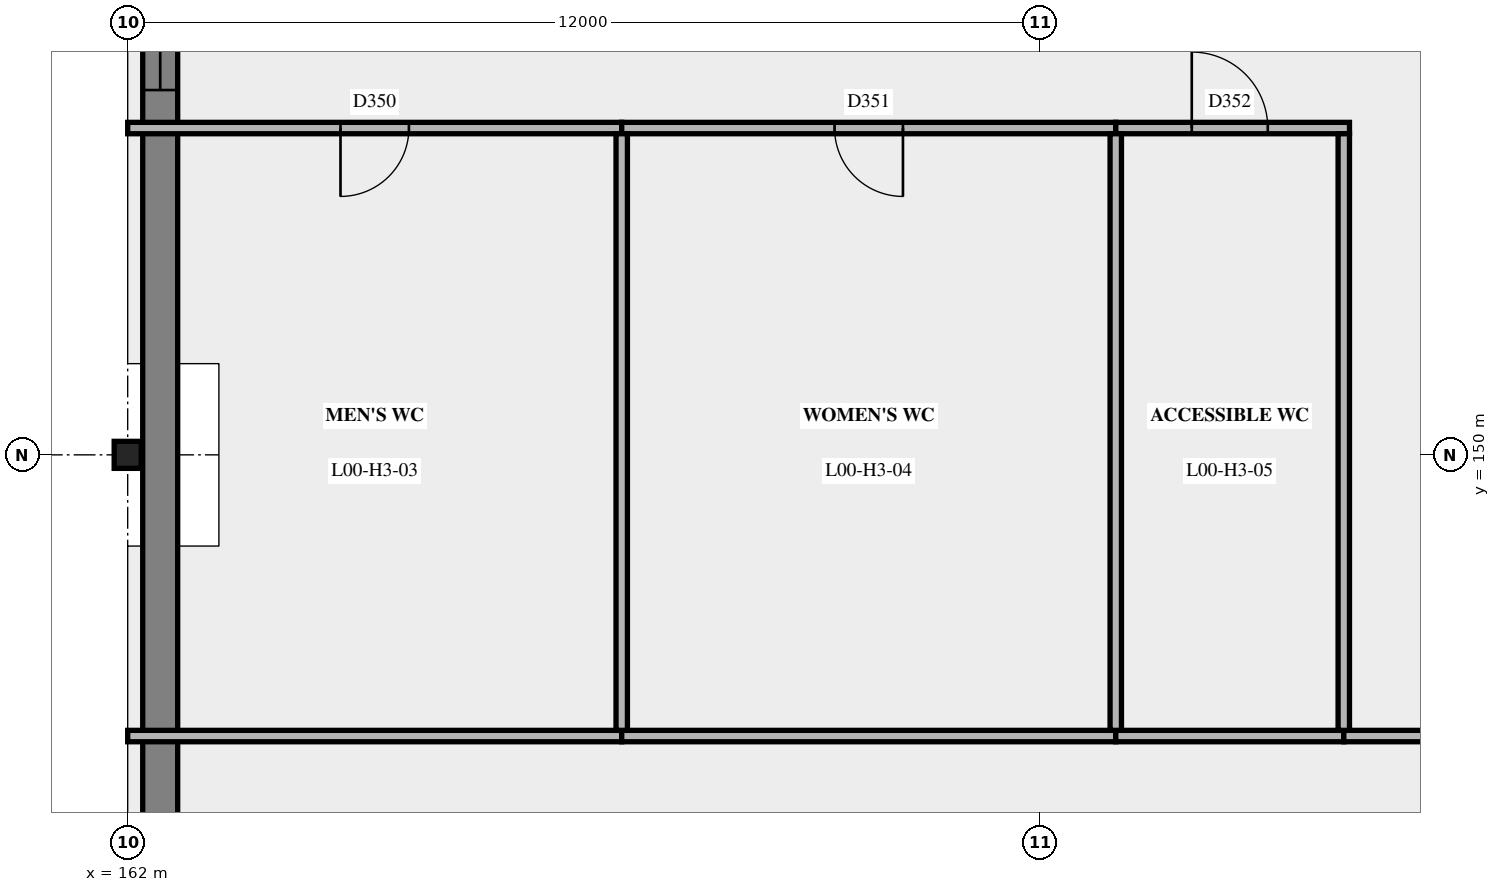
"""IFC4 building model, lengths in metres.
Left out: names, types, materials, properties, quantities, classifications, styles, units other than length and angle.
Written with IfcOpenShell. Run it as: python <this file> out.ifc"""

import sys

from ifc_helpers import new_model, si_unit, direction, frame, frame_2d, origin, origin_2d, place, context, subcontext, project, spatial, rectangle, hollow_circle, extrude, element, fill, save


model = new_model("IFC4")
c1 = context("Model", 3, precision=1e-05, world=origin(), true_north=direction((0.0, 1.0)))
c2 = subcontext(c1, "Body", "Model", "MODEL_VIEW")
j1 = project(units=[si_unit("LENGTHUNIT", "METRE"), si_unit("PLANEANGLEUNIT", "RADIAN")], contexts=[c1])
p1 = place(None, origin())
s1 = spatial("IfcSite", under=j1, at=p1, CompositionType="ELEMENT")
p2 = place(p1, origin())
s2 = spatial("IfcBuilding", under=s1, at=p2, CompositionType="ELEMENT")
p3 = place(p2, origin())
s3 = spatial("IfcBuildingStorey", under=s2, at=p3, CompositionType="ELEMENT", Elevation=0.0)
p4 = place(p3, frame((162.0, 150.0, 0.0), z_axis=(0.0, 0.0, 1.0), x_axis=(1.0, 0.0, 0.0)))
e1 = element("IfcColumn", 1, at=p4, inside=s3, PredefinedType="COLUMN", context=c2, shape_type="SweptSolid", body=[
    extrude(hollow_circle(Radius=0.178, WallThickness=0.012, at=origin_2d()), origin(), (0.0, 0.0, 1.0), 5.4),
])
p5 = place(p3, frame((162.428, 138.67, 0.0), z_axis=(0.0, 0.0, 1.0), x_axis=(0.0, 1.0, 0.0)))
e2 = element("IfcWall", 2, at=p5, inside=s3, PredefinedType="SOLIDWALL", context=c2, shape_type="SweptSolid", body=[
    extrude(rectangle(XDim=46.66, YDim=0.46, at=frame_2d((23.33, 0.0))), origin(), (0.0, 0.0, 1.0), 5.4),
])
p6 = place(p5, frame((16.13, 0.0, 0.0)))
e3 = element("IfcOpeningElement", 3, at=p6, cuts=e2, PredefinedType="OPENING", context=c2, shape_type="SweptSolid", body=[
    extrude(rectangle(XDim=2.4, YDim=2.4, at=frame_2d((1.2, 1.2))), frame((0.0, 0.24, 0.0), z_axis=(0.0, -1.0, 0.0), x_axis=(1.0, 0.0, 0.0)), (0.0, 0.0, 1.0), 0.48),
])
p7 = place(p5, frame((28.43, 0.0, 0.0)))
e4 = element("IfcOpeningElement", 4, at=p7, cuts=e2, PredefinedType="OPENING", context=c2, shape_type="SweptSolid", body=[
    extrude(rectangle(XDim=1.8, YDim=2.1, at=frame_2d((0.9, 1.05))), frame((0.0, 0.24, 0.0), z_axis=(0.0, -1.0, 0.0), x_axis=(1.0, 0.0, 0.0)), (0.0, 0.0, 1.0), 0.48),
])
p8 = place(p5, frame((3.9, 0.0, 0.9)))
e5 = element("IfcOpeningElement", 5, at=p8, cuts=e2, PredefinedType="OPENING", context=c2, shape_type="SweptSolid", body=[
    extrude(rectangle(XDim=1.2, YDim=3.3, at=frame_2d((0.6, 1.65))), frame((0.0, 0.24, 0.0), z_axis=(0.0, -1.0, 0.0), x_axis=(1.0, 0.0, 0.0)), (0.0, 0.0, 1.0), 0.48),
])
p9 = place(p5, frame((24.9, 0.0, 0.9)))
e6 = element("IfcOpeningElement", 6, at=p9, cuts=e2, PredefinedType="OPENING", context=c2, shape_type="SweptSolid", body=[
    extrude(rectangle(XDim=1.2, YDim=3.3, at=frame_2d((0.6, 1.65))), frame((0.0, 0.24, 0.0), z_axis=(0.0, -1.0, 0.0), x_axis=(1.0, 0.0, 0.0)), (0.0, 0.0, 1.0), 0.48),
])
p10 = place(p5, frame((30.9, 0.0, 0.9)))
e7 = element("IfcOpeningElement", 7, at=p10, cuts=e2, PredefinedType="OPENING", context=c2, shape_type="SweptSolid", body=[
    extrude(rectangle(XDim=1.2, YDim=3.3, at=frame_2d((0.6, 1.65))), frame((0.0, 0.24, 0.0), z_axis=(0.0, -1.0, 0.0), x_axis=(1.0, 0.0, 0.0)), (0.0, 0.0, 1.0), 0.48),
])
p11 = place(p5, frame((36.9, 0.0, 0.9)))
e8 = element("IfcOpeningElement", 8, at=p11, cuts=e2, PredefinedType="OPENING", context=c2, shape_type="SweptSolid", body=[
    extrude(rectangle(XDim=1.2, YDim=3.3, at=frame_2d((0.6, 1.65))), frame((0.0, 0.24, 0.0), z_axis=(0.0, -1.0, 0.0), x_axis=(1.0, 0.0, 0.0)), (0.0, 0.0, 1.0), 0.48),
])
p12 = place(p5, frame((39.9, 0.0, 0.9)))
e9 = element("IfcOpeningElement", 9, at=p12, cuts=e2, PredefinedType="OPENING", context=c2, shape_type="SweptSolid", body=[
    extrude(rectangle(XDim=1.2, YDim=3.3, at=frame_2d((0.6, 1.65))), frame((0.0, 0.24, 0.0), z_axis=(0.0, -1.0, 0.0), x_axis=(1.0, 0.0, 0.0)), (0.0, 0.0, 1.0), 0.48),
])
p13 = place(p5, frame((42.9, 0.0, 0.9)))
e10 = element("IfcOpeningElement", 10, at=p13, cuts=e2, PredefinedType="OPENING", context=c2, shape_type="SweptSolid", body=[
    extrude(rectangle(XDim=1.2, YDim=3.3, at=frame_2d((0.6, 1.65))), frame((0.0, 0.24, 0.0), z_axis=(0.0, -1.0, 0.0), x_axis=(1.0, 0.0, 0.0)), (0.0, 0.0, 1.0), 0.48),
])
for number, where, z_axis, x_axis in (
    (11, (162.0, 146.3, 0.0), (0.0, 0.0, 1.0), (1.0, 0.0, 0.0)),
    (12, (168.5, 146.3, 0.0), (0.0, 0.0, 1.0), (1.0, 0.0, 0.0)),
):
    element("IfcWall", number, at=place(p3, frame(where, z_axis=z_axis, x_axis=x_axis)), inside=s3, PredefinedType="PARTITIONING", context=c2, shape_type="SweptSolid", body=[
        extrude(rectangle(XDim=6.5, YDim=0.15, at=frame_2d((3.25, 0.0))), origin(), (0.0, 0.0, 1.0), 5.15),
    ])
p14 = place(p3, frame((175.0, 146.3, 0.0), z_axis=(0.0, 0.0, 1.0), x_axis=(1.0, 0.0, 0.0)))
e13 = element("IfcWall", 13, at=p14, inside=s3, PredefinedType="PARTITIONING", context=c2, shape_type="SweptSolid", body=[
    extrude(rectangle(XDim=3.0, YDim=0.15, at=frame_2d((1.5, 0.0))), origin(), (0.0, 0.0, 1.0), 5.15),
])
p15 = place(p3, frame((178.0, 146.3, 0.0), z_axis=(0.0, 0.0, 1.0), x_axis=(1.0, 0.0, 0.0)))
e14 = element("IfcWall", 14, at=p15, inside=s3, PredefinedType="PARTITIONING", context=c2, shape_type="SweptSolid", body=[
    extrude(rectangle(XDim=20.0, YDim=0.15, at=frame_2d((10.0, 0.0))), origin(), (0.0, 0.0, 1.0), 10.0),
])
p16 = place(p15, frame((4.1, 0.0, 0.0)))
e15 = element("IfcOpeningElement", 15, at=p16, cuts=e14, PredefinedType="OPENING", context=c2, shape_type="SweptSolid", body=[
    extrude(rectangle(XDim=1.8, YDim=2.1, at=frame_2d((0.9, 1.05))), frame((0.0, 0.085, 0.0), z_axis=(0.0, -1.0, 0.0), x_axis=(1.0, 0.0, 0.0)), (0.0, 0.0, 1.0), 0.17),
])
p17 = place(p15, frame((13.1, 0.0, 0.0)))
e16 = element("IfcOpeningElement", 16, at=p17, cuts=e14, PredefinedType="OPENING", context=c2, shape_type="SweptSolid", body=[
    extrude(rectangle(XDim=1.8, YDim=2.1, at=frame_2d((0.9, 1.05))), frame((0.0, 0.085, 0.0), z_axis=(0.0, -1.0, 0.0), x_axis=(1.0, 0.0, 0.0)), (0.0, 0.0, 1.0), 0.17),
])
p18 = place(p15, frame((1.5, 0.0, 0.0)))
e17 = element("IfcOpeningElement", 17, at=p18, cuts=e14, PredefinedType="OPENING", context=c2, shape_type="SweptSolid", body=[
    extrude(rectangle(XDim=1.0, YDim=2.1, at=frame_2d((0.5, 1.05))), frame((0.0, 0.085, 0.0), z_axis=(0.0, -1.0, 0.0), x_axis=(1.0, 0.0, 0.0)), (0.0, 0.0, 1.0), 0.17),
])
p19 = place(p3, frame((162.0, 154.3, 0.0), z_axis=(0.0, 0.0, 1.0), x_axis=(1.0, 0.0, 0.0)))
e18 = element("IfcWall", 18, at=p19, inside=s3, PredefinedType="PARTITIONING", context=c2, shape_type="SweptSolid", body=[
    extrude(rectangle(XDim=6.5, YDim=0.15, at=frame_2d((3.25, 0.0))), origin(), (0.0, 0.0, 1.0), 5.15),
])
p20 = place(p19, frame((2.8, 0.0, 0.0)))
e19 = element("IfcOpeningElement", 19, at=p20, cuts=e18, PredefinedType="OPENING", context=c2, shape_type="SweptSolid", body=[
    extrude(rectangle(XDim=0.9, YDim=2.1, at=frame_2d((0.45, 1.05))), frame((0.0, 0.085, 0.0), z_axis=(0.0, -1.0, 0.0), x_axis=(1.0, 0.0, 0.0)), (0.0, 0.0, 1.0), 0.17),
])
p21 = place(p3, frame((168.5, 154.3, 0.0), z_axis=(0.0, 0.0, 1.0), x_axis=(1.0, 0.0, 0.0)))
e20 = element("IfcWall", 20, at=p21, inside=s3, PredefinedType="PARTITIONING", context=c2, shape_type="SweptSolid", body=[
    extrude(rectangle(XDim=6.5, YDim=0.15, at=frame_2d((3.25, 0.0))), origin(), (0.0, 0.0, 1.0), 5.15),
])
p22 = place(p21, frame((2.8, 0.0, 0.0)))
e21 = element("IfcOpeningElement", 21, at=p22, cuts=e20, PredefinedType="OPENING", context=c2, shape_type="SweptSolid", body=[
    extrude(rectangle(XDim=0.9, YDim=2.1, at=frame_2d((0.45, 1.05))), frame((0.0, 0.085, 0.0), z_axis=(0.0, -1.0, 0.0), x_axis=(1.0, 0.0, 0.0)), (0.0, 0.0, 1.0), 0.17),
])
p23 = place(p3, frame((175.0, 154.3, 0.0), z_axis=(0.0, 0.0, 1.0), x_axis=(1.0, 0.0, 0.0)))
e22 = element("IfcWall", 22, at=p23, inside=s3, PredefinedType="PARTITIONING", context=c2, shape_type="SweptSolid", body=[
    extrude(rectangle(XDim=3.075, YDim=0.15, at=frame_2d((1.538, 0.0))), origin(), (0.0, 0.0, 1.0), 5.15),
])
p24 = place(p23, frame((1.0, 0.0, 0.0)))
e23 = element("IfcOpeningElement", 23, at=p24, cuts=e22, PredefinedType="OPENING", context=c2, shape_type="SweptSolid", body=[
    extrude(rectangle(XDim=1.0, YDim=2.1, at=frame_2d((0.5, 1.05))), frame((0.0, 0.085, 0.0), z_axis=(0.0, -1.0, 0.0), x_axis=(1.0, 0.0, 0.0)), (0.0, 0.0, 1.0), 0.17),
])
for number, where, z_axis, x_axis in (
    (24, (168.5, 146.375, 0.0), (0.0, 0.0, 1.0), (0.0, 1.0, 0.0)),
    (25, (175.0, 146.375, 0.0), (0.0, 0.0, 1.0), (0.0, 1.0, 0.0)),
    (26, (178.0, 146.375, 0.0), (0.0, 0.0, 1.0), (0.0, 1.0, 0.0)),
):
    element("IfcWall", number, at=place(p3, frame(where, z_axis=z_axis, x_axis=x_axis)), inside=s3, PredefinedType="PARTITIONING", context=c2, shape_type="SweptSolid", body=[
        extrude(rectangle(XDim=7.85, YDim=0.15, at=frame_2d((3.925, 0.0))), origin(), (0.0, 0.0, 1.0), 5.15),
    ])
p25 = place(p6, origin())
e27 = element("IfcDoor", 27, at=p25, inside=s3, OperationType="SLIDING_TO_LEFT", PredefinedType="DOOR", context=c2, shape_type="SweptSolid", body=[
    extrude(rectangle(XDim=2.4, YDim=2.4, at=frame_2d((1.2, 1.2))), frame((0.0, 0.025, 0.0), z_axis=(0.0, -1.0, 0.0), x_axis=(1.0, 0.0, 0.0)), (0.0, 0.0, 1.0), 0.05),
])
fill(e3, e27)
p26 = place(p20, origin())
e28 = element("IfcDoor", 28, at=p26, inside=s3, OperationType="SINGLE_SWING_RIGHT", PredefinedType="DOOR", context=c2, shape_type="SweptSolid", body=[
    extrude(rectangle(XDim=0.9, YDim=2.1, at=frame_2d((0.45, 1.05))), frame((0.0, 0.025, 0.0), z_axis=(0.0, -1.0, 0.0), x_axis=(1.0, 0.0, 0.0)), (0.0, 0.0, 1.0), 0.05),
])
fill(e19, e28)
p27 = place(p22, origin())
e29 = element("IfcDoor", 29, at=p27, inside=s3, OperationType="SINGLE_SWING_LEFT", PredefinedType="DOOR", context=c2, shape_type="SweptSolid", body=[
    extrude(rectangle(XDim=0.9, YDim=2.1, at=frame_2d((0.45, 1.05))), frame((0.0, 0.025, 0.0), z_axis=(0.0, -1.0, 0.0), x_axis=(1.0, 0.0, 0.0)), (0.0, 0.0, 1.0), 0.05),
])
fill(e21, e29)
p28 = place(p24, origin())
e30 = element("IfcDoor", 30, at=p28, inside=s3, OperationType="SINGLE_SWING_LEFT", PredefinedType="DOOR", context=c2, shape_type="SweptSolid", body=[
    extrude(rectangle(XDim=1.0, YDim=2.1, at=frame_2d((0.5, 1.05))), frame((0.0, 0.025, 0.0), z_axis=(0.0, -1.0, 0.0), x_axis=(1.0, 0.0, 0.0)), (0.0, 0.0, 1.0), 0.05),
])
fill(e23, e30)
save(model, sys.argv[1])
